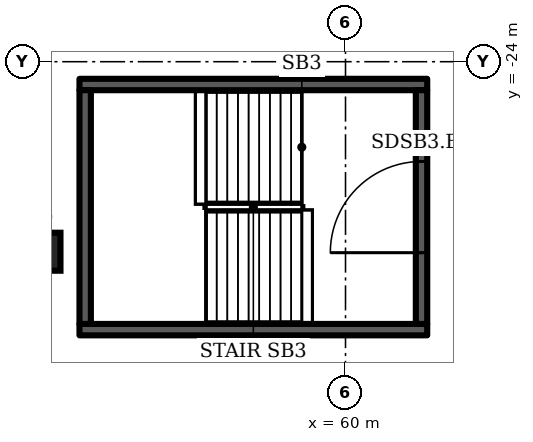
"""IFC4 building model, lengths in metres.
Left out: names, types, materials, properties, quantities, classifications, styles, units other than length and angle.
Written with IfcOpenShell. Run it as: python <this file> out.ifc"""

import sys

from ifc_helpers import new_model, si_unit, direction, frame, frame_2d, origin, origin_2d, place, context, subcontext, project, spatial, rectangle, extrude, element, fill, save


model = new_model("IFC4")
c1 = context("Model", 3, precision=1e-05, world=origin(), true_north=direction((0.0, 1.0)))
c2 = subcontext(c1, "Body", "Model", "MODEL_VIEW")
j1 = project(units=[si_unit("LENGTHUNIT", "METRE"), si_unit("PLANEANGLEUNIT", "RADIAN")], contexts=[c1])
p1 = place(None, origin())
s1 = spatial("IfcSite", under=j1, at=p1, CompositionType="ELEMENT")
p2 = place(p1, origin())
s2 = spatial("IfcBuilding", under=s1, at=p2, CompositionType="ELEMENT")
p3 = place(p2, frame((0.0, 0.0, -7.2)))
s3 = spatial("IfcBuildingStorey", under=s2, at=p3, CompositionType="ELEMENT", Elevation=-7.2)
p4 = place(p3, frame((52.0, -29.0, 0.0), z_axis=(0.0, 0.0, 1.0), x_axis=(1.0, 0.0, 0.0)))
e1 = element("IfcColumn", 1, at=p4, inside=s3, PredefinedType="COLUMN", context=c2, shape_type="SweptSolid", body=[
    extrude(rectangle(XDim=1.0, YDim=1.0, at=origin_2d()), origin(), (0.0, 0.0, 1.0), 7.2),
])
for number, where, z_axis, x_axis in (
    (2, (53.0, -31.05, 0.0), (0.0, 0.0, 1.0), (1.0, 0.0, 0.0)),
    (3, (53.0, -24.6, 0.0), (0.0, 0.0, 1.0), (1.0, 0.0, 0.0)),
):
    element("IfcWall", number, at=place(p3, frame(where, z_axis=z_axis, x_axis=x_axis)), inside=s3, PredefinedType="SHEAR", context=c2, shape_type="SweptSolid", body=[
        extrude(rectangle(XDim=9.15, YDim=0.3, at=frame_2d((4.575, 0.0))), origin(), (0.0, 0.0, 1.0), 6.9),
    ])
p5 = place(p3, frame((53.15, -30.9, 0.0), z_axis=(0.0, 0.0, 1.0), x_axis=(0.0, 1.0, 0.0)))
e4 = element("IfcWall", 4, at=p5, inside=s3, PredefinedType="SHEAR", context=c2, shape_type="SweptSolid", body=[
    extrude(rectangle(XDim=6.15, YDim=0.3, at=frame_2d((3.075, 0.0))), origin(), (0.0, 0.0, 1.0), 6.9),
])
p6 = place(p3, frame((62.0, -30.9, 0.0), z_axis=(0.0, 0.0, 1.0), x_axis=(0.0, 1.0, 0.0)))
e5 = element("IfcWall", 5, at=p6, inside=s3, PredefinedType="SHEAR", context=c2, shape_type="SweptSolid", body=[
    extrude(rectangle(XDim=6.15, YDim=0.3, at=frame_2d((3.075, 0.0))), origin(), (0.0, 0.0, 1.0), 6.9),
])
p7 = place(p6, frame((1.875, 0.0, 0.0)))
e6 = element("IfcOpeningElement", 6, at=p7, cuts=e5, PredefinedType="OPENING", context=c2, shape_type="SweptSolid", body=[
    extrude(rectangle(XDim=2.4, YDim=2.1, at=frame_2d((1.2, 1.05))), frame((0.0, 0.16, 0.0), z_axis=(0.0, -1.0, 0.0), x_axis=(1.0, 0.0, 0.0)), (0.0, 0.0, 1.0), 0.32),
])
p8 = place(p7, origin())
e7 = element("IfcDoor", 7, at=p8, inside=s3, OperationType="DOUBLE_DOOR_SINGLE_SWING", PredefinedType="DOOR", context=c2, shape_type="SweptSolid", body=[
    extrude(rectangle(XDim=2.4, YDim=2.1, at=frame_2d((1.2, 1.05))), frame((0.0, 0.025, 0.0), z_axis=(0.0, -1.0, 0.0), x_axis=(1.0, 0.0, 0.0)), (0.0, 0.0, 1.0), 0.05),
])
fill(e6, e7)
save(model, sys.argv[1])
